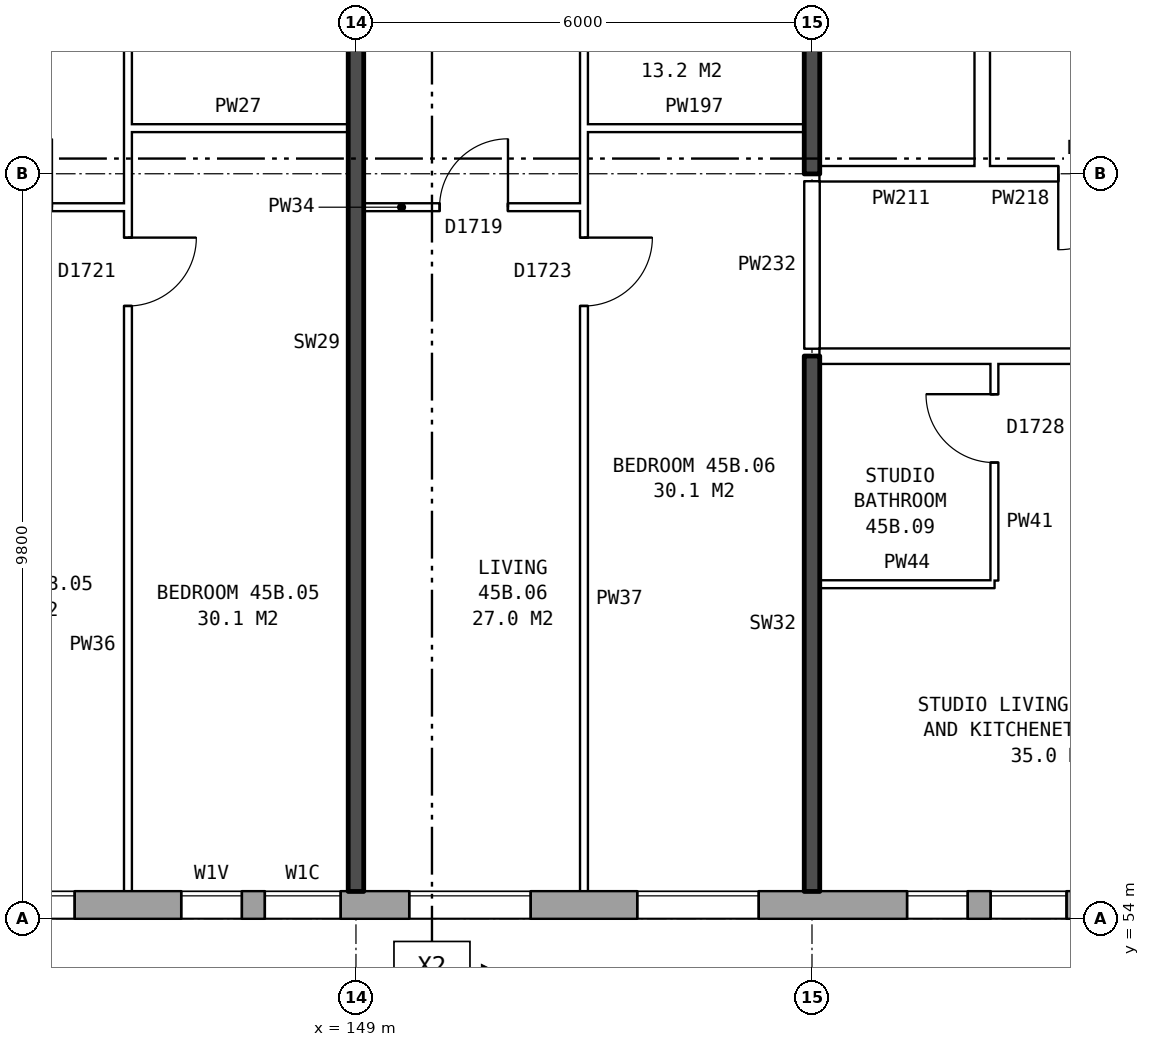
"""IFC4 building model, lengths in metres.
Left out: names, types, materials, properties, quantities, classifications, styles, units other than length and angle.
Written with IfcOpenShell. Run it as: python <this file> out.ifc"""

import sys

from ifc_helpers import new_model, si_unit, direction, frame, frame_2d, origin, place, context, subcontext, project, spatial, rectangle, extrude, element, fill, save


model = new_model("IFC4")
c1 = context("Model", 3, precision=1e-05, world=origin(), true_north=direction((0.0, 1.0)))
c2 = subcontext(c1, "Body", "Model", "MODEL_VIEW")
j1 = project(units=[si_unit("LENGTHUNIT", "METRE"), si_unit("PLANEANGLEUNIT", "RADIAN")], contexts=[c1])
p1 = place(None, origin())
s1 = spatial("IfcSite", under=j1, at=p1, CompositionType="ELEMENT")
p2 = place(p1, origin())
s2 = spatial("IfcBuilding", under=s1, at=p2, CompositionType="ELEMENT")
p3 = place(p2, frame((0.0, 0.0, 160.9)))
s3 = spatial("IfcBuildingStorey", under=s2, at=p3, CompositionType="ELEMENT", Elevation=160.9)
p4 = place(p3, frame((134.075, 54.18, 0.0), z_axis=(0.0, 0.0, 1.0), x_axis=(1.0, 0.0, 0.0)))
e1 = element("IfcWall", 1, at=p4, inside=s3, PredefinedType="STANDARD", context=c2, shape_type="SweptSolid", body=[
    extrude(rectangle(XDim=34.351, YDim=0.36, at=frame_2d((17.175, 0.0))), origin(), (0.0, 0.0, 1.0), 2.85),
])
p5 = place(p4, frame((0.625, 0.0, 0.8)))
e2 = element("IfcOpeningElement", 2, at=p5, cuts=e1, PredefinedType="OPENING", context=c2, shape_type="SweptSolid", body=[
    extrude(rectangle(XDim=1.6, YDim=1.8, at=frame_2d((0.8, 0.9))), frame((0.0, 0.19, 0.0), z_axis=(0.0, -1.0, 0.0), x_axis=(1.0, 0.0, 0.0)), (0.0, 0.0, 1.0), 0.38),
])
p6 = place(p4, frame((3.625, 0.0, 0.8)))
e3 = element("IfcOpeningElement", 3, at=p6, cuts=e1, PredefinedType="OPENING", context=c2, shape_type="SweptSolid", body=[
    extrude(rectangle(XDim=1.6, YDim=1.8, at=frame_2d((0.8, 0.9))), frame((0.0, 0.19, 0.0), z_axis=(0.0, -1.0, 0.0), x_axis=(1.0, 0.0, 0.0)), (0.0, 0.0, 1.0), 0.38),
])
p7 = place(p4, frame((6.625, 0.0, 0.8)))
e4 = element("IfcOpeningElement", 4, at=p7, cuts=e1, PredefinedType="OPENING", context=c2, shape_type="SweptSolid", body=[
    extrude(rectangle(XDim=1.6, YDim=1.8, at=frame_2d((0.8, 0.9))), frame((0.0, 0.19, 0.0), z_axis=(0.0, -1.0, 0.0), x_axis=(1.0, 0.0, 0.0)), (0.0, 0.0, 1.0), 0.38),
])
p8 = place(p4, frame((9.625, 0.0, 0.8)))
e5 = element("IfcOpeningElement", 5, at=p8, cuts=e1, PredefinedType="OPENING", context=c2, shape_type="SweptSolid", body=[
    extrude(rectangle(XDim=1.6, YDim=1.8, at=frame_2d((0.8, 0.9))), frame((0.0, 0.19, 0.0), z_axis=(0.0, -1.0, 0.0), x_axis=(1.0, 0.0, 0.0)), (0.0, 0.0, 1.0), 0.38),
])
p9 = place(p4, frame((12.625, 0.0, 0.15)))
e6 = element("IfcOpeningElement", 6, at=p9, cuts=e1, PredefinedType="OPENING", context=c2, shape_type="SweptSolid", body=[
    extrude(rectangle(XDim=0.8, YDim=0.9, at=frame_2d((0.4, 0.45))), frame((0.0, 0.19, 0.0), z_axis=(0.0, -1.0, 0.0), x_axis=(1.0, 0.0, 0.0)), (0.0, 0.0, 1.0), 0.38),
])
p10 = place(p4, frame((15.625, 0.0, 0.8)))
e7 = element("IfcOpeningElement", 7, at=p10, cuts=e1, PredefinedType="OPENING", context=c2, shape_type="SweptSolid", body=[
    extrude(rectangle(XDim=1.6, YDim=1.8, at=frame_2d((0.8, 0.9))), frame((0.0, 0.19, 0.0), z_axis=(0.0, -1.0, 0.0), x_axis=(1.0, 0.0, 0.0)), (0.0, 0.0, 1.0), 0.38),
])
p11 = place(p4, frame((18.625, 0.0, 0.8)))
e8 = element("IfcOpeningElement", 8, at=p11, cuts=e1, PredefinedType="OPENING", context=c2, shape_type="SweptSolid", body=[
    extrude(rectangle(XDim=1.6, YDim=1.8, at=frame_2d((0.8, 0.9))), frame((0.0, 0.19, 0.0), z_axis=(0.0, -1.0, 0.0), x_axis=(1.0, 0.0, 0.0)), (0.0, 0.0, 1.0), 0.38),
])
p12 = place(p4, frame((22.175, 0.0, 1.7)))
e9 = element("IfcOpeningElement", 9, at=p12, cuts=e1, PredefinedType="OPENING", context=c2, shape_type="SweptSolid", body=[
    extrude(rectangle(XDim=0.8, YDim=0.9, at=frame_2d((0.4, 0.45))), frame((0.0, 0.19, 0.0), z_axis=(0.0, -1.0, 0.0), x_axis=(1.0, 0.0, 0.0)), (0.0, 0.0, 1.0), 0.38),
])
p13 = place(p4, frame((24.625, 0.0, 0.8)))
e10 = element("IfcOpeningElement", 10, at=p13, cuts=e1, PredefinedType="OPENING", context=c2, shape_type="SweptSolid", body=[
    extrude(rectangle(XDim=1.6, YDim=1.8, at=frame_2d((0.8, 0.9))), frame((0.0, 0.19, 0.0), z_axis=(0.0, -1.0, 0.0), x_axis=(1.0, 0.0, 0.0)), (0.0, 0.0, 1.0), 0.38),
])
p14 = place(p4, frame((27.625, 0.0, 0.8)))
e11 = element("IfcOpeningElement", 11, at=p14, cuts=e1, PredefinedType="OPENING", context=c2, shape_type="SweptSolid", body=[
    extrude(rectangle(XDim=1.6, YDim=1.8, at=frame_2d((0.8, 0.9))), frame((0.0, 0.19, 0.0), z_axis=(0.0, -1.0, 0.0), x_axis=(1.0, 0.0, 0.0)), (0.0, 0.0, 1.0), 0.38),
])
p15 = place(p4, frame((30.625, 0.0, 0.8)))
e12 = element("IfcOpeningElement", 12, at=p15, cuts=e1, PredefinedType="OPENING", context=c2, shape_type="SweptSolid", body=[
    extrude(rectangle(XDim=1.6, YDim=1.8, at=frame_2d((0.8, 0.9))), frame((0.0, 0.19, 0.0), z_axis=(0.0, -1.0, 0.0), x_axis=(1.0, 0.0, 0.0)), (0.0, 0.0, 1.0), 0.38),
])
p16 = place(p4, frame((13.725, 0.0, 0.25)))
e13 = element("IfcOpeningElement", 13, at=p16, cuts=e1, PredefinedType="OPENING", context=c2, shape_type="SweptSolid", body=[
    extrude(rectangle(XDim=1.0, YDim=1.8, at=frame_2d((0.5, 0.9))), frame((0.0, 0.19, 0.0), z_axis=(0.0, -1.0, 0.0), x_axis=(1.0, 0.0, 0.0)), (0.0, 0.0, 1.0), 0.38),
])
p17 = place(p4, frame((23.275, 0.0, 0.8)))
e14 = element("IfcOpeningElement", 14, at=p17, cuts=e1, PredefinedType="OPENING", context=c2, shape_type="SweptSolid", body=[
    extrude(rectangle(XDim=1.0, YDim=1.8, at=frame_2d((0.5, 0.9))), frame((0.0, 0.19, 0.0), z_axis=(0.0, -1.0, 0.0), x_axis=(1.0, 0.0, 0.0)), (0.0, 0.0, 1.0), 0.38),
])
p18 = place(p3, frame((157.24, 63.9, 0.0), z_axis=(0.0, 0.0, 1.0), x_axis=(0.0, 1.0, 0.0)))
e15 = element("IfcWall", 15, at=p18, inside=s3, PredefinedType="PARTITIONING", context=c2, shape_type="SweptSolid", body=[
    extrude(rectangle(XDim=12.2, YDim=0.2, at=frame_2d((6.1, 0.0))), origin(), (0.0, 0.0, 1.0), 2.85),
])
p19 = place(p18, frame((5.1, 0.0, 0.0)))
e16 = element("IfcOpeningElement", 16, at=p19, cuts=e15, PredefinedType="OPENING", context=c2, shape_type="SweptSolid", body=[
    extrude(rectangle(XDim=2.0, YDim=2.1, at=frame_2d((1.0, 1.05))), frame((0.0, 0.11, 0.0), z_axis=(0.0, -1.0, 0.0), x_axis=(1.0, 0.0, 0.0)), (0.0, 0.0, 1.0), 0.22),
])
p20 = place(p3, frame((155.1, 58.4, 0.0), z_axis=(0.0, 0.0, 1.0), x_axis=(1.0, 0.0, 0.0)))
e17 = element("IfcWall", 17, at=p20, inside=s3, PredefinedType="PARTITIONING", context=c2, shape_type="SweptSolid", body=[
    extrude(rectangle(XDim=2.3, YDim=0.1, at=frame_2d((1.15, 0.0))), origin(), (0.0, 0.0, 1.0), 2.85),
])
p21 = place(p3, frame((155.1, 61.4, 0.0), z_axis=(0.0, 0.0, 1.0), x_axis=(1.0, 0.0, 0.0)))
e18 = element("IfcWall", 18, at=p21, inside=s3, PredefinedType="PARTITIONING", context=c2, shape_type="SweptSolid", body=[
    extrude(rectangle(XDim=16.04, YDim=0.2, at=frame_2d((8.02, 0.0))), origin(), (0.0, 0.0, 1.0), 2.85),
])
p22 = place(p21, frame((3.6, 0.0, 0.0)))
e19 = element("IfcOpeningElement", 19, at=p22, cuts=e18, PredefinedType="OPENING", context=c2, shape_type="SweptSolid", body=[
    extrude(rectangle(XDim=1.0, YDim=2.1, at=frame_2d((0.5, 1.05))), frame((0.0, 0.11, 0.0), z_axis=(0.0, -1.0, 0.0), x_axis=(1.0, 0.0, 0.0)), (0.0, 0.0, 1.0), 0.22),
])
p23 = place(p21, frame((8.4, 0.0, 0.0)))
e20 = element("IfcOpeningElement", 20, at=p23, cuts=e18, PredefinedType="OPENING", context=c2, shape_type="SweptSolid", body=[
    extrude(rectangle(XDim=1.0, YDim=2.1, at=frame_2d((0.5, 1.05))), frame((0.0, 0.11, 0.0), z_axis=(0.0, -1.0, 0.0), x_axis=(1.0, 0.0, 0.0)), (0.0, 0.0, 1.0), 0.22),
])
p24 = place(p3, frame((143.1, 63.36, 0.0), z_axis=(0.0, 0.0, 1.0), x_axis=(1.0, 0.0, 0.0)))
e21 = element("IfcWall", 21, at=p24, inside=s3, PredefinedType="PARTITIONING", context=c2, shape_type="SweptSolid", body=[
    extrude(rectangle(XDim=2.9, YDim=0.1, at=frame_2d((1.45, 0.0))), origin(), (0.0, 0.0, 1.0), 2.85),
])
p25 = place(p24, frame((1.0, 0.0, 0.0)))
e22 = element("IfcOpeningElement", 22, at=p25, cuts=e21, PredefinedType="OPENING", context=c2, shape_type="SweptSolid", body=[
    extrude(rectangle(XDim=0.9, YDim=2.1, at=frame_2d((0.45, 1.05))), frame((0.0, 0.06, 0.0), z_axis=(0.0, -1.0, 0.0), x_axis=(1.0, 0.0, 0.0)), (0.0, 0.0, 1.0), 0.12),
])
p26 = place(p3, frame((149.1, 63.36, 0.0), z_axis=(0.0, 0.0, 1.0), x_axis=(1.0, 0.0, 0.0)))
e23 = element("IfcWall", 23, at=p26, inside=s3, PredefinedType="PARTITIONING", context=c2, shape_type="SweptSolid", body=[
    extrude(rectangle(XDim=2.9, YDim=0.1, at=frame_2d((1.45, 0.0))), origin(), (0.0, 0.0, 1.0), 2.85),
])
p27 = place(p26, frame((1.0, 0.0, 0.0)))
e24 = element("IfcOpeningElement", 24, at=p27, cuts=e23, PredefinedType="OPENING", context=c2, shape_type="SweptSolid", body=[
    extrude(rectangle(XDim=0.9, YDim=2.1, at=frame_2d((0.45, 1.05))), frame((0.0, 0.06, 0.0), z_axis=(0.0, -1.0, 0.0), x_axis=(1.0, 0.0, 0.0)), (0.0, 0.0, 1.0), 0.12),
])
p28 = place(p3, frame((155.1, 63.8, 0.0), z_axis=(0.0, 0.0, 1.0), x_axis=(1.0, 0.0, 0.0)))
e25 = element("IfcWall", 25, at=p28, inside=s3, PredefinedType="PARTITIONING", context=c2, shape_type="SweptSolid", body=[
    extrude(rectangle(XDim=2.14, YDim=0.2, at=frame_2d((1.07, 0.0))), origin(), (0.0, 0.0, 1.0), 2.85),
])
p29 = place(p3, frame((157.24, 63.8, 0.0), z_axis=(0.0, 0.0, 1.0), x_axis=(1.0, 0.0, 0.0)))
e26 = element("IfcWall", 26, at=p29, inside=s3, PredefinedType="PARTITIONING", context=c2, shape_type="SweptSolid", body=[
    extrude(rectangle(XDim=3.0, YDim=0.2, at=frame_2d((1.5, 0.0))), origin(), (0.0, 0.0, 1.0), 2.85),
])
p30 = place(p29, frame((1.0, 0.0, 0.0)))
e27 = element("IfcOpeningElement", 27, at=p30, cuts=e26, PredefinedType="OPENING", context=c2, shape_type="SweptSolid", body=[
    extrude(rectangle(XDim=1.0, YDim=2.1, at=frame_2d((0.5, 1.05))), frame((0.0, 0.11, 0.0), z_axis=(0.0, -1.0, 0.0), x_axis=(1.0, 0.0, 0.0)), (0.0, 0.0, 1.0), 0.22),
])
for number, where, z_axis, x_axis in (
    (28, (146.0, 64.4, 0.0), (0.0, 0.0, 1.0), (1.0, 0.0, 0.0)),
    (29, (152.0, 64.4, 0.0), (0.0, 0.0, 1.0), (1.0, 0.0, 0.0)),
):
    element("IfcWall", number, at=place(p3, frame(where, z_axis=z_axis, x_axis=x_axis)), inside=s3, PredefinedType="PARTITIONING", context=c2, shape_type="SweptSolid", body=[
        extrude(rectangle(XDim=2.9, YDim=0.1, at=frame_2d((1.45, 0.0))), origin(), (0.0, 0.0, 1.0), 2.85),
    ])
p31 = place(p3, frame((146.0, 54.36, 0.0), z_axis=(0.0, 0.0, 1.0), x_axis=(0.0, 1.0, 0.0)))
e30 = element("IfcWall", 30, at=p31, inside=s3, PredefinedType="PARTITIONING", context=c2, shape_type="SweptSolid", body=[
    extrude(rectangle(XDim=14.34, YDim=0.1, at=frame_2d((7.17, 0.0))), origin(), (0.0, 0.0, 1.0), 2.85),
])
p32 = place(p31, frame((7.7, 0.0, 0.0)))
e31 = element("IfcOpeningElement", 31, at=p32, cuts=e30, PredefinedType="OPENING", context=c2, shape_type="SweptSolid", body=[
    extrude(rectangle(XDim=0.9, YDim=2.1, at=frame_2d((0.45, 1.05))), frame((0.0, 0.06, 0.0), z_axis=(0.0, -1.0, 0.0), x_axis=(1.0, 0.0, 0.0)), (0.0, 0.0, 1.0), 0.12),
])
p33 = place(p31, frame((13.04, 0.0, 0.0)))
e32 = element("IfcOpeningElement", 32, at=p33, cuts=e30, PredefinedType="OPENING", context=c2, shape_type="SweptSolid", body=[
    extrude(rectangle(XDim=0.9, YDim=2.1, at=frame_2d((0.45, 1.05))), frame((0.0, 0.06, 0.0), z_axis=(0.0, -1.0, 0.0), x_axis=(1.0, 0.0, 0.0)), (0.0, 0.0, 1.0), 0.12),
])
p34 = place(p3, frame((149.0, 54.36, 0.0), z_axis=(0.0, 0.0, 1.0), x_axis=(0.0, 1.0, 0.0)))
e33 = element("IfcWall", 33, at=p34, inside=s3, PredefinedType="SOLIDWALL", context=c2, shape_type="SweptSolid", body=[
    extrude(rectangle(XDim=14.44, YDim=0.2, at=frame_2d((7.22, 0.0))), origin(), (0.0, 0.0, 1.0), 2.85),
])
p35 = place(p3, frame((152.0, 54.36, 0.0), z_axis=(0.0, 0.0, 1.0), x_axis=(0.0, 1.0, 0.0)))
e34 = element("IfcWall", 34, at=p35, inside=s3, PredefinedType="PARTITIONING", context=c2, shape_type="SweptSolid", body=[
    extrude(rectangle(XDim=14.34, YDim=0.1, at=frame_2d((7.17, 0.0))), origin(), (0.0, 0.0, 1.0), 2.85),
])
p36 = place(p35, frame((7.7, 0.0, 0.0)))
e35 = element("IfcOpeningElement", 35, at=p36, cuts=e34, PredefinedType="OPENING", context=c2, shape_type="SweptSolid", body=[
    extrude(rectangle(XDim=0.9, YDim=2.1, at=frame_2d((0.45, 1.05))), frame((0.0, 0.06, 0.0), z_axis=(0.0, -1.0, 0.0), x_axis=(1.0, 0.0, 0.0)), (0.0, 0.0, 1.0), 0.12),
])
p37 = place(p35, frame((13.04, 0.0, 0.0)))
e36 = element("IfcOpeningElement", 36, at=p37, cuts=e34, PredefinedType="OPENING", context=c2, shape_type="SweptSolid", body=[
    extrude(rectangle(XDim=0.9, YDim=2.1, at=frame_2d((0.45, 1.05))), frame((0.0, 0.06, 0.0), z_axis=(0.0, -1.0, 0.0), x_axis=(1.0, 0.0, 0.0)), (0.0, 0.0, 1.0), 0.12),
])
p38 = place(p3, frame((155.0, 54.36, 0.0), z_axis=(0.0, 0.0, 1.0), x_axis=(0.0, 1.0, 0.0)))
e37 = element("IfcWall", 37, at=p38, inside=s3, PredefinedType="SOLIDWALL", context=c2, shape_type="SweptSolid", body=[
    extrude(rectangle(XDim=7.04, YDim=0.2, at=frame_2d((3.52, 0.0))), origin(), (0.0, 0.0, 1.0), 2.85),
])
p39 = place(p3, frame((155.0, 61.5, 0.0), z_axis=(0.0, 0.0, 1.0), x_axis=(0.0, 1.0, 0.0)))
e38 = element("IfcWall", 38, at=p39, inside=s3, PredefinedType="PARTITIONING", context=c2, shape_type="SweptSolid", body=[
    extrude(rectangle(XDim=2.2, YDim=0.2, at=frame_2d((1.1, 0.0))), origin(), (0.0, 0.0, 1.0), 2.85),
])
p40 = place(p3, frame((155.0, 63.8, 0.0), z_axis=(0.0, 0.0, 1.0), x_axis=(0.0, 1.0, 0.0)))
e39 = element("IfcWall", 39, at=p40, inside=s3, PredefinedType="SOLIDWALL", context=c2, shape_type="SweptSolid", body=[
    extrude(rectangle(XDim=5.0, YDim=0.2, at=frame_2d((2.5, 0.0))), origin(), (0.0, 0.0, 1.0), 2.85),
])
p41 = place(p3, frame((157.4, 58.45, 0.0), z_axis=(0.0, 0.0, 1.0), x_axis=(0.0, 1.0, 0.0)))
e40 = element("IfcWall", 40, at=p41, inside=s3, PredefinedType="PARTITIONING", context=c2, shape_type="SweptSolid", body=[
    extrude(rectangle(XDim=2.85, YDim=0.1, at=frame_2d((1.425, 0.0))), origin(), (0.0, 0.0, 1.0), 2.85),
])
p42 = place(p41, frame((1.55, 0.0, 0.0)))
e41 = element("IfcOpeningElement", 41, at=p42, cuts=e40, PredefinedType="OPENING", context=c2, shape_type="SweptSolid", body=[
    extrude(rectangle(XDim=0.9, YDim=2.1, at=frame_2d((0.45, 1.05))), frame((0.0, 0.06, 0.0), z_axis=(0.0, -1.0, 0.0), x_axis=(1.0, 0.0, 0.0)), (0.0, 0.0, 1.0), 0.12),
])
p43 = place(p8, origin())
e42 = element("IfcWindow", 42, at=p43, inside=s3, PartitioningType="SINGLE_PANEL", PredefinedType="WINDOW", context=c2, shape_type="SweptSolid", body=[
    extrude(rectangle(XDim=1.6, YDim=1.8, at=frame_2d((0.8, 0.9))), frame((0.0, 0.15, 0.0), z_axis=(0.0, -1.0, 0.0), x_axis=(1.0, 0.0, 0.0)), (0.0, 0.0, 1.0), 0.06),
])
fill(e5, e42)
p44 = place(p9, origin())
e43 = element("IfcWindow", 43, at=p44, inside=s3, PartitioningType="SINGLE_PANEL", PredefinedType="WINDOW", context=c2, shape_type="SweptSolid", body=[
    extrude(rectangle(XDim=0.8, YDim=0.9, at=frame_2d((0.4, 0.45))), frame((0.0, 0.15, 0.0), z_axis=(0.0, -1.0, 0.0), x_axis=(1.0, 0.0, 0.0)), (0.0, 0.0, 1.0), 0.06),
])
fill(e6, e43)
p45 = place(p10, origin())
e44 = element("IfcWindow", 44, at=p45, inside=s3, PartitioningType="SINGLE_PANEL", PredefinedType="WINDOW", context=c2, shape_type="SweptSolid", body=[
    extrude(rectangle(XDim=1.6, YDim=1.8, at=frame_2d((0.8, 0.9))), frame((0.0, 0.15, 0.0), z_axis=(0.0, -1.0, 0.0), x_axis=(1.0, 0.0, 0.0)), (0.0, 0.0, 1.0), 0.06),
])
fill(e7, e44)
p46 = place(p11, origin())
e45 = element("IfcWindow", 45, at=p46, inside=s3, PartitioningType="SINGLE_PANEL", PredefinedType="WINDOW", context=c2, shape_type="SweptSolid", body=[
    extrude(rectangle(XDim=1.6, YDim=1.8, at=frame_2d((0.8, 0.9))), frame((0.0, 0.15, 0.0), z_axis=(0.0, -1.0, 0.0), x_axis=(1.0, 0.0, 0.0)), (0.0, 0.0, 1.0), 0.06),
])
fill(e8, e45)
p47 = place(p12, origin())
e46 = element("IfcWindow", 46, at=p47, inside=s3, PartitioningType="SINGLE_PANEL", PredefinedType="WINDOW", context=c2, shape_type="SweptSolid", body=[
    extrude(rectangle(XDim=0.8, YDim=0.9, at=frame_2d((0.4, 0.45))), frame((0.0, 0.15, 0.0), z_axis=(0.0, -1.0, 0.0), x_axis=(1.0, 0.0, 0.0)), (0.0, 0.0, 1.0), 0.06),
])
fill(e9, e46)
p48 = place(p30, frame((1.0, 0.0, 0.0), z_axis=(0.0, 0.0, 1.0), x_axis=(-1.0, 0.0, 0.0)))
e47 = element("IfcDoor", 47, at=p48, inside=s3, OperationType="SINGLE_SWING_RIGHT", PredefinedType="DOOR", context=c2, shape_type="SweptSolid", body=[
    extrude(rectangle(XDim=1.0, YDim=2.1, at=frame_2d((0.5, 1.05))), frame((0.0, 0.025, 0.0), z_axis=(0.0, -1.0, 0.0), x_axis=(1.0, 0.0, 0.0)), (0.0, 0.0, 1.0), 0.05),
])
fill(e27, e47)
p49 = place(p32, frame((0.9, 0.0, 0.0), z_axis=(0.0, 0.0, 1.0), x_axis=(-1.0, 0.0, 0.0)))
e48 = element("IfcDoor", 48, at=p49, inside=s3, OperationType="SINGLE_SWING_LEFT", PredefinedType="DOOR", context=c2, shape_type="SweptSolid", body=[
    extrude(rectangle(XDim=0.9, YDim=2.1, at=frame_2d((0.45, 1.05))), frame((0.0, 0.025, 0.0), z_axis=(0.0, -1.0, 0.0), x_axis=(1.0, 0.0, 0.0)), (0.0, 0.0, 1.0), 0.05),
])
fill(e31, e48)
p50 = place(p36, frame((0.9, 0.0, 0.0), z_axis=(0.0, 0.0, 1.0), x_axis=(-1.0, 0.0, 0.0)))
e49 = element("IfcDoor", 49, at=p50, inside=s3, OperationType="SINGLE_SWING_LEFT", PredefinedType="DOOR", context=c2, shape_type="SweptSolid", body=[
    extrude(rectangle(XDim=0.9, YDim=2.1, at=frame_2d((0.45, 1.05))), frame((0.0, 0.025, 0.0), z_axis=(0.0, -1.0, 0.0), x_axis=(1.0, 0.0, 0.0)), (0.0, 0.0, 1.0), 0.05),
])
fill(e35, e49)
p51 = place(p27, origin())
e50 = element("IfcDoor", 50, at=p51, inside=s3, OperationType="SINGLE_SWING_RIGHT", PredefinedType="DOOR", context=c2, shape_type="SweptSolid", body=[
    extrude(rectangle(XDim=0.9, YDim=2.1, at=frame_2d((0.45, 1.05))), frame((0.0, 0.025, 0.0), z_axis=(0.0, -1.0, 0.0), x_axis=(1.0, 0.0, 0.0)), (0.0, 0.0, 1.0), 0.05),
])
fill(e24, e50)
p52 = place(p42, origin())
e51 = element("IfcDoor", 51, at=p52, inside=s3, OperationType="SINGLE_SWING_RIGHT", PredefinedType="DOOR", context=c2, shape_type="SweptSolid", body=[
    extrude(rectangle(XDim=0.9, YDim=2.1, at=frame_2d((0.45, 1.05))), frame((0.0, 0.025, 0.0), z_axis=(0.0, -1.0, 0.0), x_axis=(1.0, 0.0, 0.0)), (0.0, 0.0, 1.0), 0.05),
])
fill(e41, e51)
p53 = place(p16, origin())
e52 = element("IfcWindow", 52, at=p53, inside=s3, PartitioningType="SINGLE_PANEL", PredefinedType="WINDOW", context=c2, shape_type="SweptSolid", body=[
    extrude(rectangle(XDim=1.0, YDim=1.8, at=frame_2d((0.5, 0.9))), frame((0.0, 0.15, 0.0), z_axis=(0.0, -1.0, 0.0), x_axis=(1.0, 0.0, 0.0)), (0.0, 0.0, 1.0), 0.06),
])
fill(e13, e52)
p54 = place(p17, origin())
e53 = element("IfcWindow", 53, at=p54, inside=s3, PartitioningType="SINGLE_PANEL", PredefinedType="WINDOW", context=c2, shape_type="SweptSolid", body=[
    extrude(rectangle(XDim=1.0, YDim=1.8, at=frame_2d((0.5, 0.9))), frame((0.0, 0.15, 0.0), z_axis=(0.0, -1.0, 0.0), x_axis=(1.0, 0.0, 0.0)), (0.0, 0.0, 1.0), 0.06),
])
fill(e14, e53)
save(model, sys.argv[1])
